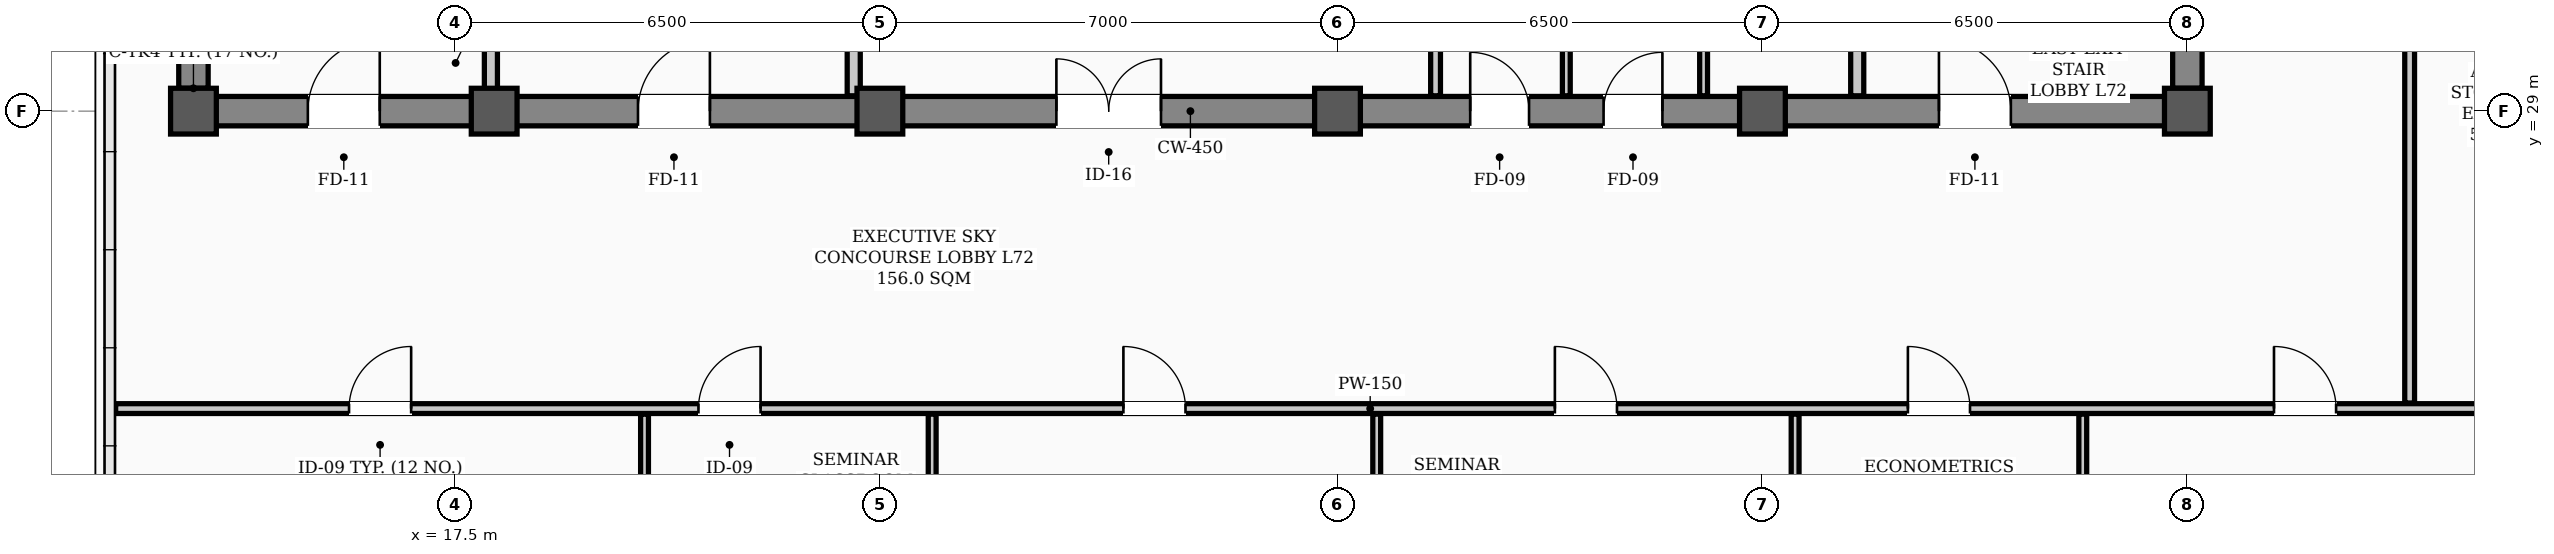
"""IFC4 building model, lengths in metres.
Left out: names, types, materials, properties, quantities, classifications, styles, units other than length and angle.
Written with IfcOpenShell. Run it as: python <this file> out.ifc"""

import sys

from ifc_helpers import new_model, si_unit, direction, frame, frame_2d, origin, origin_2d, place, context, subcontext, project, spatial, rectangle, hollow_rectangle, extrude, element, fill, save


model = new_model("IFC4")
c1 = context("Model", 3, precision=1e-05, world=origin(), true_north=direction((0.0, 1.0)))
c2 = subcontext(c1, "Body", "Model", "MODEL_VIEW")
j1 = project(units=[si_unit("LENGTHUNIT", "METRE"), si_unit("PLANEANGLEUNIT", "RADIAN")], contexts=[c1])
p1 = place(None, origin())
s1 = spatial("IfcSite", under=j1, at=p1, CompositionType="ELEMENT")
p2 = place(p1, origin())
s2 = spatial("IfcBuilding", under=s1, at=p2, CompositionType="ELEMENT")
p3 = place(p2, frame((0.0, 0.0, 289.1)))
s3 = spatial("IfcBuildingStorey", under=s2, at=p3, CompositionType="ELEMENT", Elevation=289.1)
for number, where, z_axis, x_axis in (
    (1, (13.5, 29.0, 0.0), (0.0, 0.0, 1.0), (1.0, 0.0, 0.0)),
    (2, (18.1, 29.0, 0.0), (0.0, 0.0, 1.0), (1.0, 0.0, 0.0)),
    (3, (24.0, 29.0, 0.0), (0.0, 0.0, 1.0), (1.0, 0.0, 0.0)),
    (4, (31.0, 29.0, 0.0), (0.0, 0.0, 1.0), (1.0, 0.0, 0.0)),
    (5, (37.5, 29.0, 0.0), (0.0, 0.0, 1.0), (1.0, 0.0, 0.0)),
    (6, (44.0, 29.0, 0.0), (0.0, 0.0, 1.0), (1.0, 0.0, 0.0)),
):
    element("IfcColumn", number, at=place(p3, frame(where, z_axis=z_axis, x_axis=x_axis)), inside=s3, PredefinedType="COLUMN", context=c2, shape_type="SweptSolid", body=[
        extrude(hollow_rectangle(XDim=0.7, YDim=0.7, WallThickness=0.028, InnerFilletRadius=0.014, OuterFilletRadius=0.042, at=origin_2d()), origin(), (0.0, 0.0, 1.0), 3.9),
    ])
p4 = place(p3, frame((13.5, 29.0, 0.0), z_axis=(0.0, 0.0, 1.0), x_axis=(1.0, 0.0, 0.0)))
e7 = element("IfcWall", 7, at=p4, inside=s3, PredefinedType="SHEAR", context=c2, shape_type="SweptSolid", body=[
    extrude(rectangle(XDim=30.5, YDim=0.45, at=frame_2d((15.25, 0.0))), origin(), (0.0, 0.0, 1.0), 3.72),
])
p5 = place(p4, frame((1.75, 0.0, 0.0)))
e8 = element("IfcOpeningElement", 8, at=p5, cuts=e7, PredefinedType="OPENING", context=c2, shape_type="SweptSolid", body=[
    extrude(rectangle(XDim=1.1, YDim=2.08, at=frame_2d((0.55, 1.04))), frame((0.0, 0.235, 0.0), z_axis=(0.0, -1.0, 0.0), x_axis=(1.0, 0.0, 0.0)), (0.0, 0.0, 1.0), 0.47),
])
p6 = place(p4, frame((26.7, 0.0, 0.0)))
e9 = element("IfcOpeningElement", 9, at=p6, cuts=e7, PredefinedType="OPENING", context=c2, shape_type="SweptSolid", body=[
    extrude(rectangle(XDim=1.1, YDim=2.08, at=frame_2d((0.55, 1.04))), frame((0.0, 0.235, 0.0), z_axis=(0.0, -1.0, 0.0), x_axis=(1.0, 0.0, 0.0)), (0.0, 0.0, 1.0), 0.47),
])
p7 = place(p4, frame((6.8, 0.0, 0.0)))
e10 = element("IfcOpeningElement", 10, at=p7, cuts=e7, PredefinedType="OPENING", context=c2, shape_type="SweptSolid", body=[
    extrude(rectangle(XDim=1.1, YDim=2.08, at=frame_2d((0.55, 1.04))), frame((0.0, 0.235, 0.0), z_axis=(0.0, -1.0, 0.0), x_axis=(1.0, 0.0, 0.0)), (0.0, 0.0, 1.0), 0.47),
])
p8 = place(p4, frame((13.2, 0.0, 0.0)))
e11 = element("IfcOpeningElement", 11, at=p8, cuts=e7, PredefinedType="OPENING", context=c2, shape_type="SweptSolid", body=[
    extrude(rectangle(XDim=1.6, YDim=2.08, at=frame_2d((0.8, 1.04))), frame((0.0, 0.235, 0.0), z_axis=(0.0, -1.0, 0.0), x_axis=(1.0, 0.0, 0.0)), (0.0, 0.0, 1.0), 0.47),
])
p9 = place(p4, frame((19.53, 0.0, 0.0)))
e12 = element("IfcOpeningElement", 12, at=p9, cuts=e7, PredefinedType="OPENING", context=c2, shape_type="SweptSolid", body=[
    extrude(rectangle(XDim=0.9, YDim=2.08, at=frame_2d((0.45, 1.04))), frame((0.0, 0.235, 0.0), z_axis=(0.0, -1.0, 0.0), x_axis=(1.0, 0.0, 0.0)), (0.0, 0.0, 1.0), 0.47),
])
p10 = place(p4, frame((21.57, 0.0, 0.0)))
e13 = element("IfcOpeningElement", 13, at=p10, cuts=e7, PredefinedType="OPENING", context=c2, shape_type="SweptSolid", body=[
    extrude(rectangle(XDim=0.9, YDim=2.08, at=frame_2d((0.45, 1.04))), frame((0.0, 0.235, 0.0), z_axis=(0.0, -1.0, 0.0), x_axis=(1.0, 0.0, 0.0)), (0.0, 0.0, 1.0), 0.47),
])
for number, where, z_axis, x_axis in (
    (14, (13.5, 29.35, 0.0), (0.0, 0.0, 1.0), (0.0, 1.0, 0.0)),
    (15, (44.0, 29.35, 0.0), (0.0, 0.0, 1.0), (0.0, 1.0, 0.0)),
):
    element("IfcWall", number, at=place(p3, frame(where, z_axis=z_axis, x_axis=x_axis)), inside=s3, PredefinedType="SHEAR", context=c2, shape_type="SweptSolid", body=[
        extrude(rectangle(XDim=8.6, YDim=0.45, at=frame_2d((4.3, 0.0))), origin(), (0.0, 0.0, 1.0), 3.72),
    ])
p11 = place(p3, frame((12.31, 24.45, 0.0), z_axis=(0.0, 0.0, 1.0), x_axis=(1.0, 0.0, 0.0)))
e16 = element("IfcWall", 16, at=p11, inside=s3, PredefinedType="PARTITIONING", context=c2, shape_type="SweptSolid", body=[
    extrude(rectangle(XDim=38.38, YDim=0.15, at=frame_2d((19.19, 0.0))), origin(), (0.0, 0.0, 1.0), 3.2),
])
p12 = place(p11, frame((3.57, 0.0, 0.0)))
e17 = element("IfcOpeningElement", 17, at=p12, cuts=e16, PredefinedType="OPENING", context=c2, shape_type="SweptSolid", body=[
    extrude(rectangle(XDim=0.95, YDim=2.08, at=frame_2d((0.475, 1.04))), frame((0.0, 0.085, 0.0), z_axis=(0.0, -1.0, 0.0), x_axis=(1.0, 0.0, 0.0)), (0.0, 0.0, 1.0), 0.17),
])
p13 = place(p11, frame((8.915, 0.0, 0.0)))
e18 = element("IfcOpeningElement", 18, at=p13, cuts=e16, PredefinedType="OPENING", context=c2, shape_type="SweptSolid", body=[
    extrude(rectangle(XDim=0.95, YDim=2.08, at=frame_2d((0.475, 1.04))), frame((0.0, 0.085, 0.0), z_axis=(0.0, -1.0, 0.0), x_axis=(1.0, 0.0, 0.0)), (0.0, 0.0, 1.0), 0.17),
])
p14 = place(p11, frame((15.415, 0.0, 0.0)))
e19 = element("IfcOpeningElement", 19, at=p14, cuts=e16, PredefinedType="OPENING", context=c2, shape_type="SweptSolid", body=[
    extrude(rectangle(XDim=0.95, YDim=2.08, at=frame_2d((0.475, 1.04))), frame((0.0, 0.085, 0.0), z_axis=(0.0, -1.0, 0.0), x_axis=(1.0, 0.0, 0.0)), (0.0, 0.0, 1.0), 0.17),
])
p15 = place(p11, frame((22.015, 0.0, 0.0)))
e20 = element("IfcOpeningElement", 20, at=p15, cuts=e16, PredefinedType="OPENING", context=c2, shape_type="SweptSolid", body=[
    extrude(rectangle(XDim=0.95, YDim=2.08, at=frame_2d((0.475, 1.04))), frame((0.0, 0.085, 0.0), z_axis=(0.0, -1.0, 0.0), x_axis=(1.0, 0.0, 0.0)), (0.0, 0.0, 1.0), 0.17),
])
p16 = place(p11, frame((27.415, 0.0, 0.0)))
e21 = element("IfcOpeningElement", 21, at=p16, cuts=e16, PredefinedType="OPENING", context=c2, shape_type="SweptSolid", body=[
    extrude(rectangle(XDim=0.95, YDim=2.08, at=frame_2d((0.475, 1.04))), frame((0.0, 0.085, 0.0), z_axis=(0.0, -1.0, 0.0), x_axis=(1.0, 0.0, 0.0)), (0.0, 0.0, 1.0), 0.17),
])
p17 = place(p11, frame((33.015, 0.0, 0.0)))
e22 = element("IfcOpeningElement", 22, at=p17, cuts=e16, PredefinedType="OPENING", context=c2, shape_type="SweptSolid", body=[
    extrude(rectangle(XDim=0.95, YDim=2.08, at=frame_2d((0.475, 1.04))), frame((0.0, 0.085, 0.0), z_axis=(0.0, -1.0, 0.0), x_axis=(1.0, 0.0, 0.0)), (0.0, 0.0, 1.0), 0.17),
])
p18 = place(p3, frame((18.05, 29.235, 0.0), z_axis=(0.0, 0.0, 1.0), x_axis=(0.0, 1.0, 0.0)))
e23 = element("IfcWall", 23, at=p18, inside=s3, PredefinedType="STANDARD", context=c2, shape_type="SweptSolid", body=[
    extrude(rectangle(XDim=1.065, YDim=0.2, at=frame_2d((0.532, 0.0))), origin(), (0.0, 0.0, 1.0), 3.72),
])
p19 = place(p3, frame((38.95, 29.235, 0.0), z_axis=(0.0, 0.0, 1.0), x_axis=(0.0, 1.0, 0.0)))
e24 = element("IfcWall", 24, at=p19, inside=s3, PredefinedType="STANDARD", context=c2, shape_type="SweptSolid", body=[
    extrude(rectangle(XDim=1.065, YDim=0.2, at=frame_2d((0.532, 0.0))), origin(), (0.0, 0.0, 1.0), 3.4),
])
p20 = place(p3, frame((23.6, 29.235, 0.0), z_axis=(0.0, 0.0, 1.0), x_axis=(0.0, 1.0, 0.0)))
e25 = element("IfcWall", 25, at=p20, inside=s3, PredefinedType="STANDARD", context=c2, shape_type="SweptSolid", body=[
    extrude(rectangle(XDim=5.465, YDim=0.2, at=frame_2d((2.732, 0.0))), origin(), (0.0, 0.0, 1.0), 3.2),
])
p21 = place(p3, frame((32.5, 29.235, 0.0), z_axis=(0.0, 0.0, 1.0), x_axis=(0.0, 1.0, 0.0)))
e26 = element("IfcWall", 26, at=p21, inside=s3, PredefinedType="PARTITIONING", context=c2, shape_type="SweptSolid", body=[
    extrude(rectangle(XDim=2.53, YDim=0.15, at=frame_2d((1.265, 0.0))), origin(), (0.0, 0.0, 1.0), 3.4),
])
for number, where, z_axis, x_axis in (
    (27, (36.6, 29.235, 0.0), (0.0, 0.0, 1.0), (0.0, 1.0, 0.0)),
    (28, (34.5, 29.235, 0.0), (0.0, 0.0, 1.0), (0.0, 1.0, 0.0)),
):
    element("IfcWall", number, at=place(p3, frame(where, z_axis=z_axis, x_axis=x_axis)), inside=s3, PredefinedType="PARTITIONING", context=c2, shape_type="SweptSolid", body=[
        extrude(rectangle(XDim=2.53, YDim=0.12, at=frame_2d((1.265, 0.0))), origin(), (0.0, 0.0, 1.0), 3.4),
    ])
p22 = place(p3, frame((47.4, 24.535, 0.0), z_axis=(0.0, 0.0, 1.0), x_axis=(0.0, 1.0, 0.0)))
e29 = element("IfcWall", 29, at=p22, inside=s3, PredefinedType="PARTITIONING", context=c2, shape_type="SweptSolid", body=[
    extrude(rectangle(XDim=17.13, YDim=0.15, at=frame_2d((8.565, 0.0))), origin(), (0.0, 0.0, 1.0), 3.1),
])
p23 = place(p22, frame((8.09, 0.0, 0.0)))
e30 = element("IfcOpeningElement", 30, at=p23, cuts=e29, PredefinedType="OPENING", context=c2, shape_type="SweptSolid", body=[
    extrude(rectangle(XDim=0.95, YDim=2.08, at=frame_2d((0.475, 1.04))), frame((0.0, 0.085, 0.0), z_axis=(0.0, -1.0, 0.0), x_axis=(1.0, 0.0, 0.0)), (0.0, 0.0, 1.0), 0.17),
])
p24 = place(p3, frame((20.4, 18.71, 0.0), z_axis=(0.0, 0.0, 1.0), x_axis=(0.0, 1.0, 0.0)))
e31 = element("IfcWall", 31, at=p24, inside=s3, PredefinedType="PARTITIONING", context=c2, shape_type="SweptSolid", body=[
    extrude(rectangle(XDim=5.655, YDim=0.12, at=frame_2d((2.828, 0.0))), origin(), (0.0, 0.0, 1.0), 3.72),
])
p25 = place(p3, frame((24.8, 20.47, 0.0), z_axis=(0.0, 0.0, 1.0), x_axis=(0.0, 1.0, 0.0)))
e32 = element("IfcWall", 32, at=p25, inside=s3, PredefinedType="PARTITIONING", context=c2, shape_type="SweptSolid", body=[
    extrude(rectangle(XDim=3.895, YDim=0.12, at=frame_2d((1.948, 0.0))), origin(), (0.0, 0.0, 1.0), 3.1),
])
for number, where, z_axis, x_axis in (
    (33, (31.6, 18.71, 0.0), (0.0, 0.0, 1.0), (0.0, 1.0, 0.0)),
    (34, (38.0, 18.71, 0.0), (0.0, 0.0, 1.0), (0.0, 1.0, 0.0)),
    (35, (42.4, 18.71, 0.0), (0.0, 0.0, 1.0), (0.0, 1.0, 0.0)),
):
    element("IfcWall", number, at=place(p3, frame(where, z_axis=z_axis, x_axis=x_axis)), inside=s3, PredefinedType="PARTITIONING", context=c2, shape_type="SweptSolid", body=[
        extrude(rectangle(XDim=5.655, YDim=0.12, at=frame_2d((2.828, 0.0))), origin(), (0.0, 0.0, 1.0), 3.1),
    ])
p26 = place(p5, origin())
e36 = element("IfcDoor", 36, at=p26, inside=s3, OperationType="SINGLE_SWING_RIGHT", PredefinedType="DOOR", context=c2, shape_type="SweptSolid", body=[
    extrude(rectangle(XDim=1.1, YDim=2.08, at=frame_2d((0.55, 1.04))), frame((0.0, 0.025, 0.0), z_axis=(0.0, -1.0, 0.0), x_axis=(1.0, 0.0, 0.0)), (0.0, 0.0, 1.0), 0.05),
])
fill(e8, e36)
p27 = place(p6, origin())
e37 = element("IfcDoor", 37, at=p27, inside=s3, OperationType="SINGLE_SWING_LEFT", PredefinedType="DOOR", context=c2, shape_type="SweptSolid", body=[
    extrude(rectangle(XDim=1.1, YDim=2.08, at=frame_2d((0.55, 1.04))), frame((0.0, 0.025, 0.0), z_axis=(0.0, -1.0, 0.0), x_axis=(1.0, 0.0, 0.0)), (0.0, 0.0, 1.0), 0.05),
])
fill(e9, e37)
p28 = place(p7, origin())
e38 = element("IfcDoor", 38, at=p28, inside=s3, OperationType="SINGLE_SWING_RIGHT", PredefinedType="DOOR", context=c2, shape_type="SweptSolid", body=[
    extrude(rectangle(XDim=1.1, YDim=2.08, at=frame_2d((0.55, 1.04))), frame((0.0, 0.025, 0.0), z_axis=(0.0, -1.0, 0.0), x_axis=(1.0, 0.0, 0.0)), (0.0, 0.0, 1.0), 0.05),
])
fill(e10, e38)
p29 = place(p8, origin())
e39 = element("IfcDoor", 39, at=p29, inside=s3, OperationType="DOUBLE_DOOR_SINGLE_SWING", PredefinedType="DOOR", context=c2, shape_type="SweptSolid", body=[
    extrude(rectangle(XDim=1.6, YDim=2.08, at=frame_2d((0.8, 1.04))), frame((0.0, 0.025, 0.0), z_axis=(0.0, -1.0, 0.0), x_axis=(1.0, 0.0, 0.0)), (0.0, 0.0, 1.0), 0.05),
])
fill(e11, e39)
p30 = place(p9, origin())
e40 = element("IfcDoor", 40, at=p30, inside=s3, OperationType="SINGLE_SWING_LEFT", PredefinedType="DOOR", context=c2, shape_type="SweptSolid", body=[
    extrude(rectangle(XDim=0.9, YDim=2.08, at=frame_2d((0.45, 1.04))), frame((0.0, 0.025, 0.0), z_axis=(0.0, -1.0, 0.0), x_axis=(1.0, 0.0, 0.0)), (0.0, 0.0, 1.0), 0.05),
])
fill(e12, e40)
p31 = place(p10, origin())
e41 = element("IfcDoor", 41, at=p31, inside=s3, OperationType="SINGLE_SWING_RIGHT", PredefinedType="DOOR", context=c2, shape_type="SweptSolid", body=[
    extrude(rectangle(XDim=0.9, YDim=2.08, at=frame_2d((0.45, 1.04))), frame((0.0, 0.025, 0.0), z_axis=(0.0, -1.0, 0.0), x_axis=(1.0, 0.0, 0.0)), (0.0, 0.0, 1.0), 0.05),
])
fill(e13, e41)
p32 = place(p12, origin())
e42 = element("IfcDoor", 42, at=p32, inside=s3, OperationType="SINGLE_SWING_RIGHT", PredefinedType="DOOR", context=c2, shape_type="SweptSolid", body=[
    extrude(rectangle(XDim=0.95, YDim=2.08, at=frame_2d((0.475, 1.04))), frame((0.0, 0.025, 0.0), z_axis=(0.0, -1.0, 0.0), x_axis=(1.0, 0.0, 0.0)), (0.0, 0.0, 1.0), 0.05),
])
fill(e17, e42)
p33 = place(p13, origin())
e43 = element("IfcDoor", 43, at=p33, inside=s3, OperationType="SINGLE_SWING_RIGHT", PredefinedType="DOOR", context=c2, shape_type="SweptSolid", body=[
    extrude(rectangle(XDim=0.95, YDim=2.08, at=frame_2d((0.475, 1.04))), frame((0.0, 0.025, 0.0), z_axis=(0.0, -1.0, 0.0), x_axis=(1.0, 0.0, 0.0)), (0.0, 0.0, 1.0), 0.05),
])
fill(e18, e43)
p34 = place(p14, origin())
e44 = element("IfcDoor", 44, at=p34, inside=s3, OperationType="SINGLE_SWING_LEFT", PredefinedType="DOOR", context=c2, shape_type="SweptSolid", body=[
    extrude(rectangle(XDim=0.95, YDim=2.08, at=frame_2d((0.475, 1.04))), frame((0.0, 0.025, 0.0), z_axis=(0.0, -1.0, 0.0), x_axis=(1.0, 0.0, 0.0)), (0.0, 0.0, 1.0), 0.05),
])
fill(e19, e44)
p35 = place(p15, origin())
e45 = element("IfcDoor", 45, at=p35, inside=s3, OperationType="SINGLE_SWING_LEFT", PredefinedType="DOOR", context=c2, shape_type="SweptSolid", body=[
    extrude(rectangle(XDim=0.95, YDim=2.08, at=frame_2d((0.475, 1.04))), frame((0.0, 0.025, 0.0), z_axis=(0.0, -1.0, 0.0), x_axis=(1.0, 0.0, 0.0)), (0.0, 0.0, 1.0), 0.05),
])
fill(e20, e45)
p36 = place(p16, origin())
e46 = element("IfcDoor", 46, at=p36, inside=s3, OperationType="SINGLE_SWING_LEFT", PredefinedType="DOOR", context=c2, shape_type="SweptSolid", body=[
    extrude(rectangle(XDim=0.95, YDim=2.08, at=frame_2d((0.475, 1.04))), frame((0.0, 0.025, 0.0), z_axis=(0.0, -1.0, 0.0), x_axis=(1.0, 0.0, 0.0)), (0.0, 0.0, 1.0), 0.05),
])
fill(e21, e46)
p37 = place(p17, origin())
e47 = element("IfcDoor", 47, at=p37, inside=s3, OperationType="SINGLE_SWING_LEFT", PredefinedType="DOOR", context=c2, shape_type="SweptSolid", body=[
    extrude(rectangle(XDim=0.95, YDim=2.08, at=frame_2d((0.475, 1.04))), frame((0.0, 0.025, 0.0), z_axis=(0.0, -1.0, 0.0), x_axis=(1.0, 0.0, 0.0)), (0.0, 0.0, 1.0), 0.05),
])
fill(e22, e47)
save(model, sys.argv[1])
